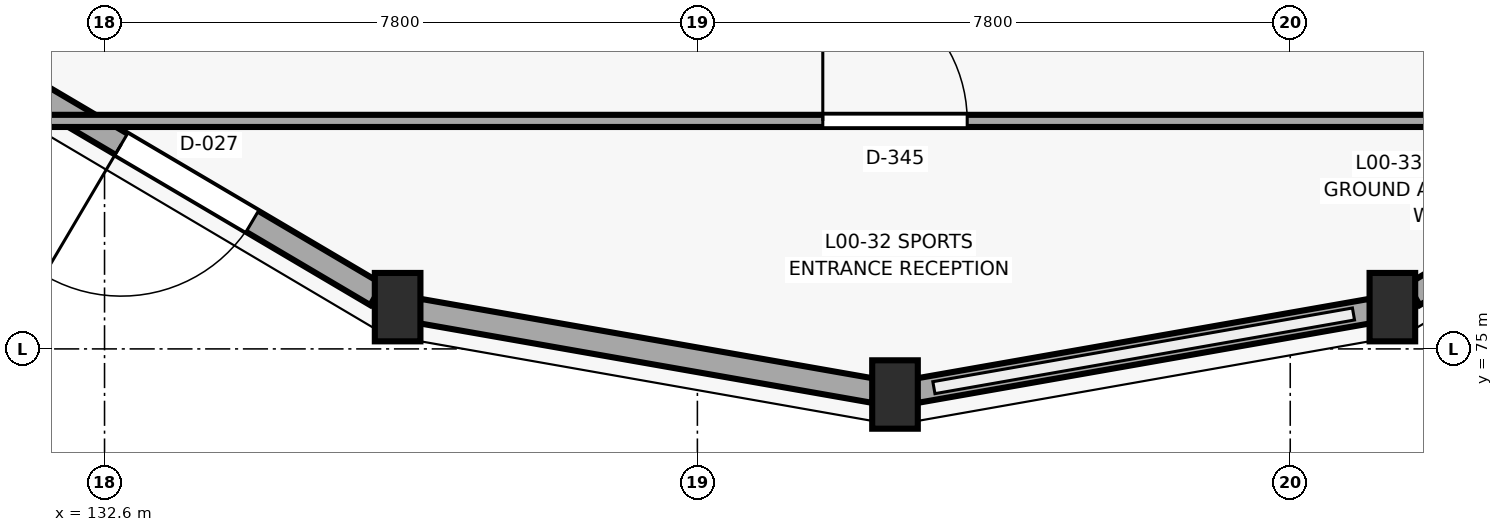
"""IFC4 building model, lengths in metres.
Left out: names, types, materials, properties, quantities, classifications, styles, units other than length and angle.
Written with IfcOpenShell. Run it as: python <this file> out.ifc"""

import sys

from ifc_helpers import new_model, si_unit, direction, frame, frame_2d, origin, origin_2d, place, context, subcontext, project, spatial, rectangle, extrude, element, fill, save


model = new_model("IFC4")
c1 = context("Model", 3, precision=1e-05, world=origin(), true_north=direction((0.0, 1.0)))
c2 = subcontext(c1, "Body", "Model", "MODEL_VIEW")
j1 = project(units=[si_unit("LENGTHUNIT", "METRE"), si_unit("PLANEANGLEUNIT", "RADIAN")], contexts=[c1])
p1 = place(None, origin())
s1 = spatial("IfcSite", under=j1, at=p1, CompositionType="ELEMENT")
p2 = place(p1, origin())
s2 = spatial("IfcBuilding", under=s1, at=p2, CompositionType="ELEMENT")
p3 = place(p2, origin())
s3 = spatial("IfcBuildingStorey", under=s2, at=p3, CompositionType="ELEMENT", Elevation=0.0)
for number, where, z_axis, x_axis in (
    (1, (136.456, 75.549, 0.0), (0.0, 0.0, 1.0), (1.0, 0.0, 0.0)),
    (2, (143.0, 74.4, 0.0), (0.0, 0.0, 1.0), (1.0, 0.0, 0.0)),
    (3, (149.544, 75.549, 0.0), (0.0, 0.0, 1.0), (1.0, 0.0, 0.0)),
):
    element("IfcColumn", number, at=place(p3, frame(where, z_axis=z_axis, x_axis=x_axis)), inside=s3, PredefinedType="COLUMN", context=c2, shape_type="SweptSolid", body=[
        extrude(rectangle(XDim=0.6, YDim=0.9, at=origin_2d()), origin(), (0.0, 0.0, 1.0), 4.5),
    ])
p4 = place(p3, frame((136.177, 75.714, 0.0), z_axis=(0.0, 0.0, 1.0), x_axis=(-0.861235880181, 0.508205429614, 0.0)))
e4 = element("IfcWall", 4, at=p4, inside=s3, PredefinedType="STANDARD", context=c2, shape_type="SweptSolid", body=[
    extrude(rectangle(XDim=5.794, YDim=0.32, at=frame_2d((2.897, 0.0))), origin(), (0.0, 0.0, 1.0), 3.445),
])
p5 = place(p4, frame((1.897, 0.0, 0.0)))
e5 = element("IfcOpeningElement", 5, at=p5, cuts=e4, PredefinedType="OPENING", context=c2, shape_type="SweptSolid", body=[
    extrude(rectangle(XDim=2.0, YDim=2.3, at=frame_2d((1.0, 1.15))), frame((0.0, 0.17, 0.0), z_axis=(0.0, -1.0, 0.0), x_axis=(1.0, 0.0, 0.0)), (0.0, 0.0, 1.0), 0.34),
])
p6 = place(p3, frame((142.725, 74.448, 0.0), z_axis=(0.0, 0.0, 1.0), x_axis=(-0.984927418504, 0.172968148166, 0.0)))
e6 = element("IfcWall", 6, at=p6, inside=s3, PredefinedType="STANDARD", context=c2, shape_type="SweptSolid", body=[
    extrude(rectangle(XDim=6.085, YDim=0.32, at=frame_2d((3.042, 0.0))), origin(), (0.0, 0.0, 1.0), 3.445),
])
p7 = place(p6, frame((1.867, 0.0, 0.9)))
e7 = element("IfcOpeningElement", 7, at=p7, cuts=e6, PredefinedType="OPENING", context=c2, shape_type="SweptSolid", body=[
    extrude(rectangle(XDim=2.35, YDim=1.55, at=frame_2d((1.175, 0.775))), frame((0.0, 0.17, 0.0), z_axis=(0.0, -1.0, 0.0), x_axis=(1.0, 0.0, 0.0)), (0.0, 0.0, 1.0), 0.34),
])
p8 = place(p3, frame((149.269, 75.501, 0.0), z_axis=(0.0, 0.0, 1.0), x_axis=(-0.984927418504, -0.172968148166, 0.0)))
e8 = element("IfcWall", 8, at=p8, inside=s3, PredefinedType="STANDARD", context=c2, shape_type="SweptSolid", body=[
    extrude(rectangle(XDim=6.085, YDim=0.32, at=frame_2d((3.042, 0.0))), origin(), (0.0, 0.0, 1.0), 0.85),
])
p9 = place(p3, frame((154.813, 78.658, 0.0), z_axis=(0.0, 0.0, 1.0), x_axis=(-0.861235880181, -0.508205429614, 0.0)))
e9 = element("IfcWall", 9, at=p9, inside=s3, PredefinedType="STANDARD", context=c2, shape_type="SweptSolid", body=[
    extrude(rectangle(XDim=5.794, YDim=0.32, at=frame_2d((2.897, 0.0))), origin(), (0.0, 0.0, 1.0), 3.445),
])
p10 = place(p9, frame((1.897, 0.0, 0.0)))
e10 = element("IfcOpeningElement", 10, at=p10, cuts=e9, PredefinedType="OPENING", context=c2, shape_type="SweptSolid", body=[
    extrude(rectangle(XDim=2.0, YDim=2.3, at=frame_2d((1.0, 1.15))), frame((0.0, 0.17, 0.0), z_axis=(0.0, -1.0, 0.0), x_axis=(1.0, 0.0, 0.0)), (0.0, 0.0, 1.0), 0.34),
])
p11 = place(p3, frame((127.5, 78.0, 0.0), z_axis=(0.0, 0.0, 1.0), x_axis=(1.0, 0.0, 0.0)))
e11 = element("IfcWall", 11, at=p11, inside=s3, PredefinedType="PARTITIONING", context=c2, shape_type="SweptSolid", body=[
    extrude(rectangle(XDim=31.0, YDim=0.16, at=frame_2d((15.5, 0.0))), origin(), (0.0, 0.0, 1.0), 4.255),
])
p12 = place(p11, frame((14.55, 0.0, 0.0)))
e12 = element("IfcOpeningElement", 12, at=p12, cuts=e11, PredefinedType="OPENING", context=c2, shape_type="SweptSolid", body=[
    extrude(rectangle(XDim=1.9, YDim=2.25, at=frame_2d((0.95, 1.125))), frame((0.0, 0.09, 0.0), z_axis=(0.0, -1.0, 0.0), x_axis=(1.0, 0.0, 0.0)), (0.0, 0.0, 1.0), 0.18),
])
p13 = place(p5, origin())
e13 = element("IfcDoor", 13, at=p13, inside=s3, OperationType="SINGLE_SWING_RIGHT", PredefinedType="DOOR", context=c2, shape_type="SweptSolid", body=[
    extrude(rectangle(XDim=2.0, YDim=2.3, at=frame_2d((1.0, 1.15))), frame((0.0, 0.025, 0.0), z_axis=(0.0, -1.0, 0.0), x_axis=(1.0, 0.0, 0.0)), (0.0, 0.0, 1.0), 0.05),
])
fill(e5, e13)
p14 = place(p7, origin())
e14 = element("IfcWindow", 14, at=p14, inside=s3, PartitioningType="SINGLE_PANEL", PredefinedType="WINDOW", context=c2, shape_type="SweptSolid", body=[
    extrude(rectangle(XDim=2.35, YDim=1.55, at=frame_2d((1.175, 0.775))), frame((0.0, 0.03, 0.0), z_axis=(0.0, -1.0, 0.0), x_axis=(1.0, 0.0, 0.0)), (0.0, 0.0, 1.0), 0.06),
])
fill(e7, e14)
p15 = place(p12, origin())
e15 = element("IfcDoor", 15, at=p15, inside=s3, OperationType="SINGLE_SWING_LEFT", PredefinedType="DOOR", context=c2, shape_type="SweptSolid", body=[
    extrude(rectangle(XDim=1.9, YDim=2.25, at=frame_2d((0.95, 1.125))), frame((0.0, 0.025, 0.0), z_axis=(0.0, -1.0, 0.0), x_axis=(1.0, 0.0, 0.0)), (0.0, 0.0, 1.0), 0.05),
])
fill(e12, e15)
save(model, sys.argv[1])
